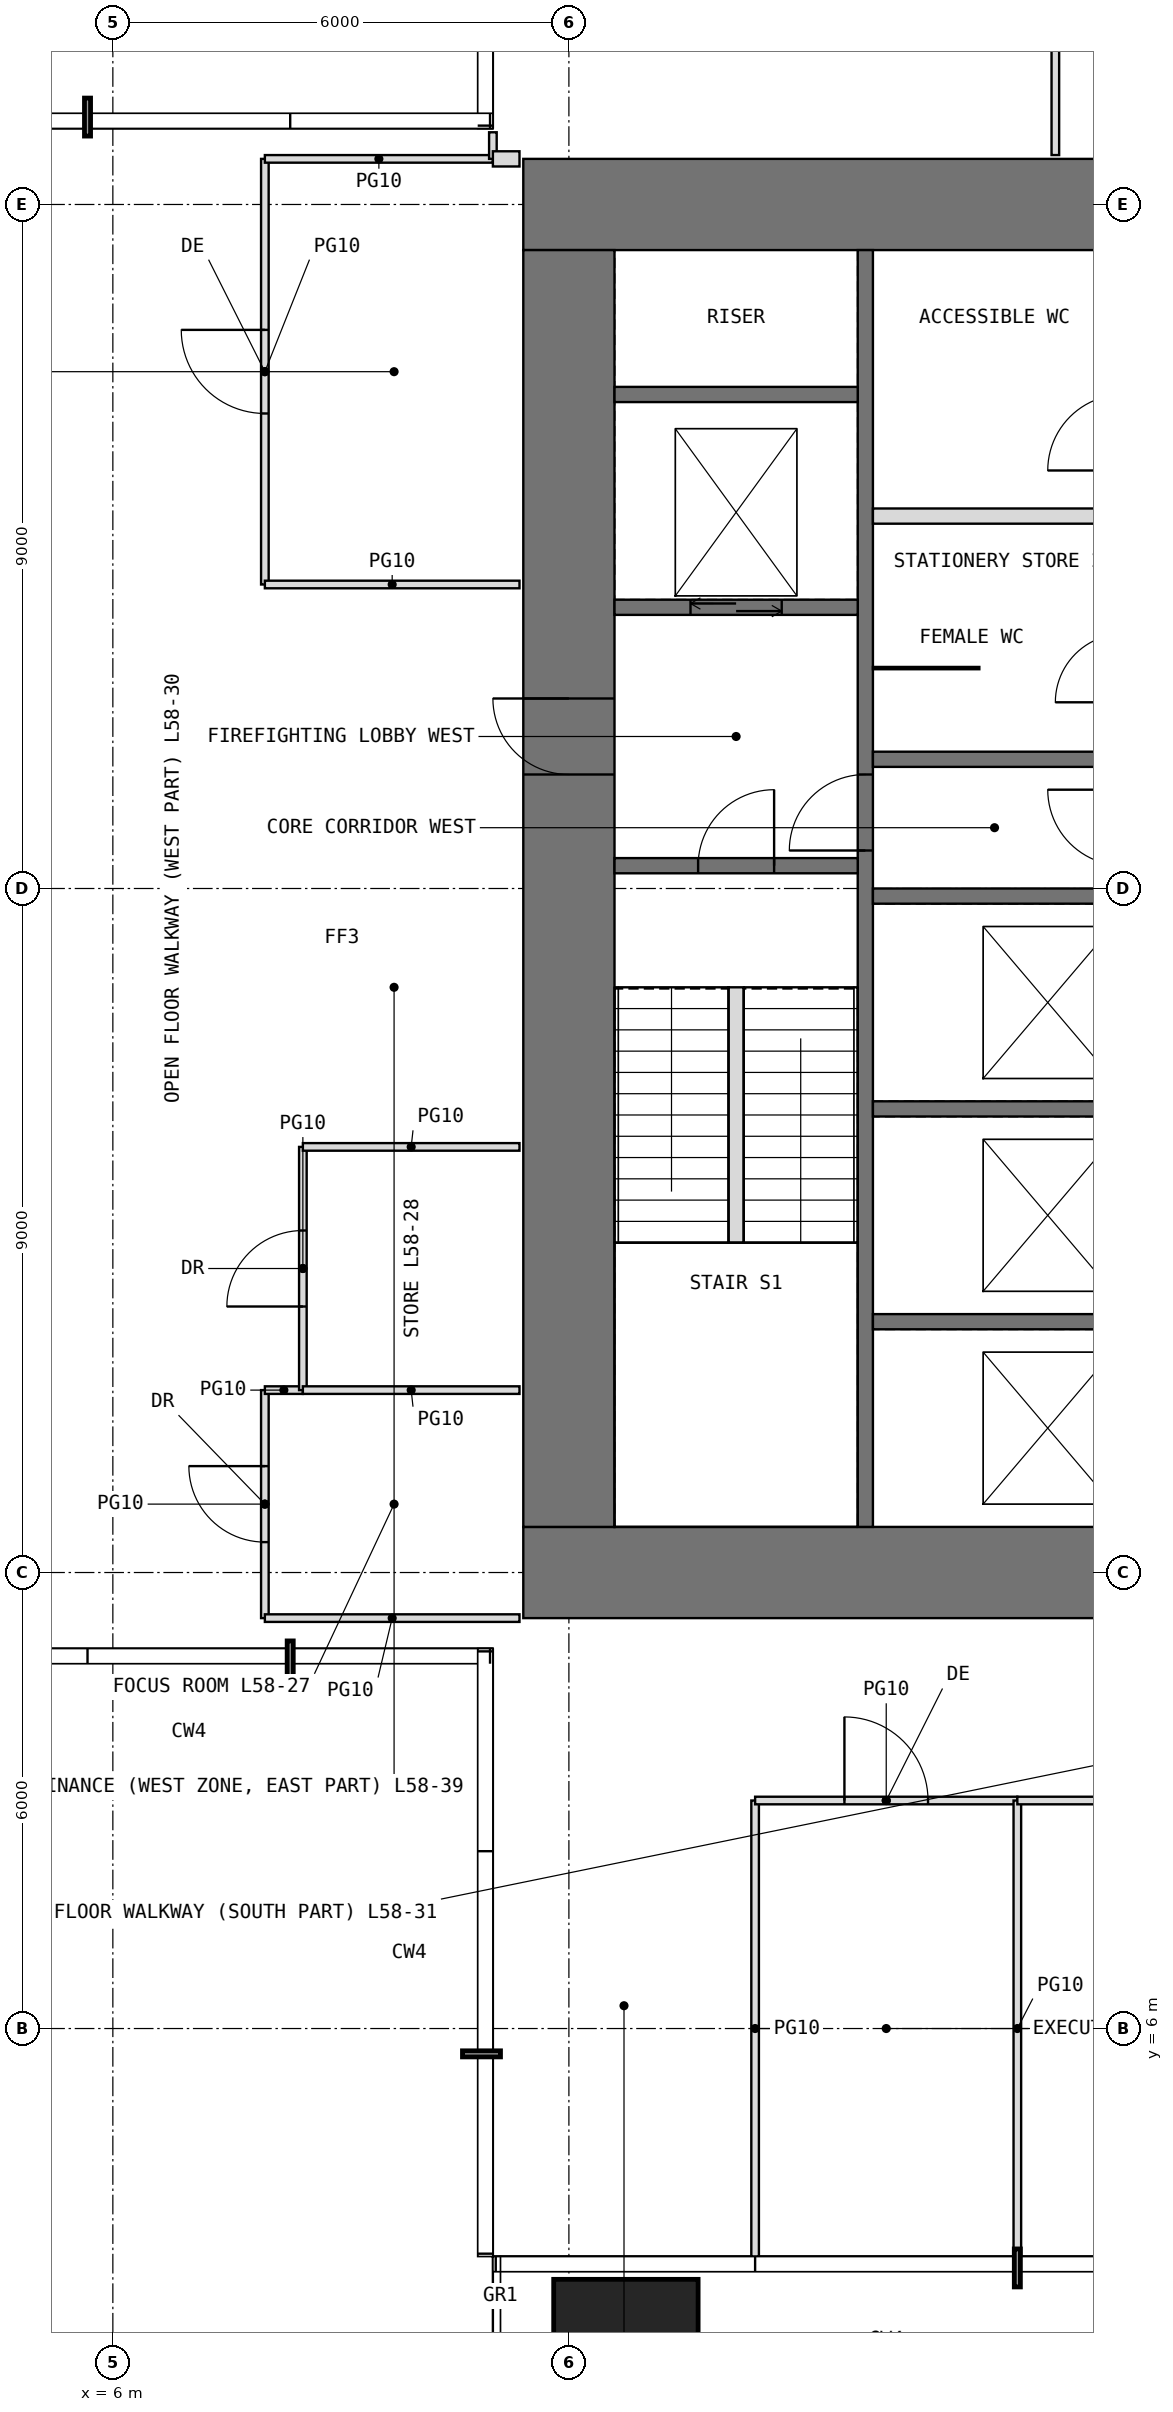
"""IFC4 building model, lengths in metres.
Left out: names, types, materials, properties, quantities, classifications, styles, units other than length and angle.
Written with IfcOpenShell. Run it as: python <this file> out.ifc"""

import sys

from ifc_helpers import new_model, si_unit, direction, frame, frame_2d, origin, origin_2d, place, context, subcontext, project, spatial, rectangle, extrude, element, fill, save


model = new_model("IFC4")
c1 = context("Model", 3, precision=1e-05, world=origin(), true_north=direction((0.0, 1.0)))
c2 = subcontext(c1, "Body", "Model", "MODEL_VIEW")
j1 = project(units=[si_unit("LENGTHUNIT", "METRE"), si_unit("PLANEANGLEUNIT", "RADIAN")], contexts=[c1])
p1 = place(None, origin())
s1 = spatial("IfcSite", under=j1, at=p1, CompositionType="ELEMENT")
p2 = place(p1, origin())
s2 = spatial("IfcBuilding", under=s1, at=p2, CompositionType="ELEMENT")
p3 = place(p2, frame((0.0, 0.0, 244.0)))
s3 = spatial("IfcBuildingStorey", under=s2, at=p3, CompositionType="ELEMENT", Elevation=244.0)
p4 = place(p3, frame((12.75, 1.75, 0.0), z_axis=(0.0, 0.0, 1.0), x_axis=(1.0, 0.0, 0.0)))
e1 = element("IfcColumn", 1, at=p4, inside=s3, PredefinedType="COLUMN", context=c2, shape_type="SweptSolid", body=[
    extrude(rectangle(XDim=1.9, YDim=1.9, at=origin_2d()), origin(), (0.0, 0.0, 1.0), 4.2),
])
p5 = place(p3, frame((11.4, 12.0, -0.05), z_axis=(0.0, 0.0, 1.0), x_axis=(1.0, 0.0, 0.0)))
e2 = element("IfcWall", 2, at=p5, inside=s3, PredefinedType="SHEAR", context=c2, shape_type="SweptSolid", body=[
    extrude(rectangle(XDim=19.2, YDim=1.2, at=frame_2d((9.6, 0.0))), origin(), (0.0, 0.0, 1.0), 4.2),
])
p6 = place(p5, frame((8.6, 0.0, 0.05)))
e3 = element("IfcOpeningElement", 3, at=p6, cuts=e2, PredefinedType="OPENING", context=c2, shape_type="SweptSolid", body=[
    extrude(rectangle(XDim=2.0, YDim=2.2, at=frame_2d((1.0, 1.1))), frame((0.0, 0.61, 0.0), z_axis=(0.0, -1.0, 0.0), x_axis=(1.0, 0.0, 0.0)), (0.0, 0.0, 1.0), 1.22),
])
p7 = place(p3, frame((11.4, 30.0, -0.05), z_axis=(0.0, 0.0, 1.0), x_axis=(1.0, 0.0, 0.0)))
e4 = element("IfcWall", 4, at=p7, inside=s3, PredefinedType="SHEAR", context=c2, shape_type="SweptSolid", body=[
    extrude(rectangle(XDim=19.2, YDim=1.2, at=frame_2d((9.6, 0.0))), origin(), (0.0, 0.0, 1.0), 4.2),
])
p8 = place(p7, frame((8.6, 0.0, 0.05)))
e5 = element("IfcOpeningElement", 5, at=p8, cuts=e4, PredefinedType="OPENING", context=c2, shape_type="SweptSolid", body=[
    extrude(rectangle(XDim=2.0, YDim=2.2, at=frame_2d((1.0, 1.1))), frame((0.0, 0.61, 0.0), z_axis=(0.0, -1.0, 0.0), x_axis=(1.0, 0.0, 0.0)), (0.0, 0.0, 1.0), 1.22),
])
p9 = place(p3, frame((12.0, 12.6, -0.05), z_axis=(0.0, 0.0, 1.0), x_axis=(0.0, 1.0, 0.0)))
e6 = element("IfcWall", 6, at=p9, inside=s3, PredefinedType="SHEAR", context=c2, shape_type="SweptSolid", body=[
    extrude(rectangle(XDim=16.8, YDim=1.2, at=frame_2d((8.4, 0.0))), origin(), (0.0, 0.0, 1.0), 4.2),
])
p10 = place(p9, frame((9.9, 0.0, 0.05)))
e7 = element("IfcOpeningElement", 7, at=p10, cuts=e6, PredefinedType="OPENING", context=c2, shape_type="SweptSolid", body=[
    extrude(rectangle(XDim=1.0, YDim=2.2, at=frame_2d((0.5, 1.1))), frame((0.0, 0.61, 0.0), z_axis=(0.0, -1.0, 0.0), x_axis=(1.0, 0.0, 0.0)), (0.0, 0.0, 1.0), 1.22),
])
p11 = place(p3, frame((15.9, 12.6, -0.05), z_axis=(0.0, 0.0, 1.0), x_axis=(0.0, 1.0, 0.0)))
e8 = element("IfcWall", 8, at=p11, inside=s3, PredefinedType="SHEAR", context=c2, shape_type="SweptSolid", body=[
    extrude(rectangle(XDim=16.8, YDim=0.2, at=frame_2d((8.4, 0.0))), origin(), (0.0, 0.0, 1.0), 4.2),
])
p12 = place(p11, frame((8.9, 0.0, 0.05)))
e9 = element("IfcOpeningElement", 9, at=p12, cuts=e8, PredefinedType="OPENING", context=c2, shape_type="SweptSolid", body=[
    extrude(rectangle(XDim=1.0, YDim=2.2, at=frame_2d((0.5, 1.1))), frame((0.0, 0.11, 0.0), z_axis=(0.0, -1.0, 0.0), x_axis=(1.0, 0.0, 0.0)), (0.0, 0.0, 1.0), 0.22),
])
p13 = place(p3, frame((12.6, 21.3, -0.05), z_axis=(0.0, 0.0, 1.0), x_axis=(1.0, 0.0, 0.0)))
e10 = element("IfcWall", 10, at=p13, inside=s3, PredefinedType="SHEAR", context=c2, shape_type="SweptSolid", body=[
    extrude(rectangle(XDim=3.2, YDim=0.2, at=frame_2d((1.6, 0.0))), origin(), (0.0, 0.0, 1.0), 4.2),
])
p14 = place(p13, frame((1.1, 0.0, 0.05)))
e11 = element("IfcOpeningElement", 11, at=p14, cuts=e10, PredefinedType="OPENING", context=c2, shape_type="SweptSolid", body=[
    extrude(rectangle(XDim=1.0, YDim=2.2, at=frame_2d((0.5, 1.1))), frame((0.0, 0.11, 0.0), z_axis=(0.0, -1.0, 0.0), x_axis=(1.0, 0.0, 0.0)), (0.0, 0.0, 1.0), 0.22),
])
p15 = place(p3, frame((12.6, 24.7, -0.05), z_axis=(0.0, 0.0, 1.0), x_axis=(1.0, 0.0, 0.0)))
e12 = element("IfcWall", 12, at=p15, inside=s3, PredefinedType="SHEAR", context=c2, shape_type="SweptSolid", body=[
    extrude(rectangle(XDim=3.2, YDim=0.2, at=frame_2d((1.6, 0.0))), origin(), (0.0, 0.0, 1.0), 4.2),
])
p16 = place(p15, frame((1.0, 0.0, 0.05)))
e13 = element("IfcOpeningElement", 13, at=p16, cuts=e12, PredefinedType="OPENING", context=c2, shape_type="SweptSolid", body=[
    extrude(rectangle(XDim=1.2, YDim=2.2, at=frame_2d((0.6, 1.1))), frame((0.0, 0.11, 0.0), z_axis=(0.0, -1.0, 0.0), x_axis=(1.0, 0.0, 0.0)), (0.0, 0.0, 1.0), 0.22),
])
for number, where, z_axis, x_axis in (
    (14, (12.6, 27.5, -0.05), (0.0, 0.0, 1.0), (1.0, 0.0, 0.0)),
    (15, (16.0, 15.3, -0.05), (0.0, 0.0, 1.0), (1.0, 0.0, 0.0)),
    (16, (16.0, 18.1, -0.05), (0.0, 0.0, 1.0), (1.0, 0.0, 0.0)),
    (17, (16.0, 20.9, -0.05), (0.0, 0.0, 1.0), (1.0, 0.0, 0.0)),
    (18, (16.0, 22.7, -0.05), (0.0, 0.0, 1.0), (1.0, 0.0, 0.0)),
):
    element("IfcWall", number, at=place(p3, frame(where, z_axis=z_axis, x_axis=x_axis)), inside=s3, PredefinedType="SHEAR", context=c2, shape_type="SweptSolid", body=[
        extrude(rectangle(XDim=3.2, YDim=0.2, at=frame_2d((1.6, 0.0))), origin(), (0.0, 0.0, 1.0), 4.2),
    ])
p17 = place(p3, frame((16.0, 25.9, 0.0), z_axis=(0.0, 0.0, 1.0), x_axis=(1.0, 0.0, 0.0)))
e19 = element("IfcWall", 19, at=p17, inside=s3, PredefinedType="PARTITIONING", context=c2, shape_type="SweptSolid", body=[
    extrude(rectangle(XDim=3.2, YDim=0.2, at=frame_2d((1.6, 0.0))), origin(), (0.0, 0.0, 1.0), 3.95),
])
p18 = place(p3, frame((16.0, 23.9, 0.0), z_axis=(0.0, 0.0, 1.0), x_axis=(1.0, 0.0, 0.0)))
e20 = element("IfcWall", 20, at=p18, inside=s3, PredefinedType="PARTITIONING", context=c2, shape_type="SweptSolid", body=[
    extrude(rectangle(XDim=1.4, YDim=0.03, at=frame_2d((0.7, 0.0))), origin(), (0.0, 0.0, 1.0), 3.95),
])
p19 = place(p3, frame((8.0, 11.4, 0.0), z_axis=(0.0, 0.0, 1.0), x_axis=(0.0, 1.0, 0.0)))
e21 = element("IfcWall", 21, at=p19, inside=s3, PredefinedType="PARTITIONING", context=c2, shape_type="SweptSolid", body=[
    extrude(rectangle(XDim=3.0, YDim=0.1, at=frame_2d((1.5, 0.0))), origin(), (0.0, 0.0, 1.0), 3.95),
])
p20 = place(p19, frame((1.0, 0.0, 0.0)))
e22 = element("IfcOpeningElement", 22, at=p20, cuts=e21, PredefinedType="OPENING", context=c2, shape_type="SweptSolid", body=[
    extrude(rectangle(XDim=1.0, YDim=2.2, at=frame_2d((0.5, 1.1))), frame((0.0, 0.06, 0.0), z_axis=(0.0, -1.0, 0.0), x_axis=(1.0, 0.0, 0.0)), (0.0, 0.0, 1.0), 0.12),
])
p21 = place(p3, frame((8.0, 11.4, 0.0), z_axis=(0.0, 0.0, 1.0), x_axis=(1.0, 0.0, 0.0)))
e23 = element("IfcWall", 23, at=p21, inside=s3, PredefinedType="PARTITIONING", context=c2, shape_type="SweptSolid", body=[
    extrude(rectangle(XDim=3.35, YDim=0.1, at=frame_2d((1.675, 0.0))), origin(), (0.0, 0.0, 1.0), 3.95),
])
p22 = place(p3, frame((8.0, 14.4, 0.0), z_axis=(0.0, 0.0, 1.0), x_axis=(1.0, 0.0, 0.0)))
e24 = element("IfcWall", 24, at=p22, inside=s3, PredefinedType="PARTITIONING", context=c2, shape_type="SweptSolid", body=[
    extrude(rectangle(XDim=0.5, YDim=0.1, at=frame_2d((0.25, 0.0))), origin(), (0.0, 0.0, 1.0), 3.95),
])
p23 = place(p3, frame((8.0, 25.0, 0.0), z_axis=(0.0, 0.0, 1.0), x_axis=(0.0, 1.0, 0.0)))
e25 = element("IfcWall", 25, at=p23, inside=s3, PredefinedType="PARTITIONING", context=c2, shape_type="SweptSolid", body=[
    extrude(rectangle(XDim=5.6, YDim=0.1, at=frame_2d((2.8, 0.0))), origin(), (0.0, 0.0, 1.0), 3.95),
])
p24 = place(p23, frame((2.25, 0.0, 0.0)))
e26 = element("IfcOpeningElement", 26, at=p24, cuts=e25, PredefinedType="OPENING", context=c2, shape_type="SweptSolid", body=[
    extrude(rectangle(XDim=1.1, YDim=2.3, at=frame_2d((0.55, 1.15))), frame((0.0, 0.06, 0.0), z_axis=(0.0, -1.0, 0.0), x_axis=(1.0, 0.0, 0.0)), (0.0, 0.0, 1.0), 0.12),
])
p25 = place(p3, frame((8.0, 25.0, 0.0), z_axis=(0.0, 0.0, 1.0), x_axis=(1.0, 0.0, 0.0)))
e27 = element("IfcWall", 27, at=p25, inside=s3, PredefinedType="PARTITIONING", context=c2, shape_type="SweptSolid", body=[
    extrude(rectangle(XDim=3.35, YDim=0.1, at=frame_2d((1.675, 0.0))), origin(), (0.0, 0.0, 1.0), 3.95),
])
p26 = place(p3, frame((8.0, 30.6, 0.0), z_axis=(0.0, 0.0, 1.0), x_axis=(1.0, 0.0, 0.0)))
e28 = element("IfcWall", 28, at=p26, inside=s3, PredefinedType="PARTITIONING", context=c2, shape_type="SweptSolid", body=[
    extrude(rectangle(XDim=3.0, YDim=0.1, at=frame_2d((1.5, 0.0))), origin(), (0.0, 0.0, 1.0), 3.95),
])
p27 = place(p3, frame((8.5, 14.4, 0.0), z_axis=(0.0, 0.0, 1.0), x_axis=(0.0, 1.0, 0.0)))
e29 = element("IfcWall", 29, at=p27, inside=s3, PredefinedType="PARTITIONING", context=c2, shape_type="SweptSolid", body=[
    extrude(rectangle(XDim=3.2, YDim=0.1, at=frame_2d((1.6, 0.0))), origin(), (0.0, 0.0, 1.0), 3.95),
])
p28 = place(p27, frame((1.1, 0.0, 0.0)))
e30 = element("IfcOpeningElement", 30, at=p28, cuts=e29, PredefinedType="OPENING", context=c2, shape_type="SweptSolid", body=[
    extrude(rectangle(XDim=1.0, YDim=2.2, at=frame_2d((0.5, 1.1))), frame((0.0, 0.06, 0.0), z_axis=(0.0, -1.0, 0.0), x_axis=(1.0, 0.0, 0.0)), (0.0, 0.0, 1.0), 0.12),
])
for number, where, z_axis, x_axis in (
    (31, (8.5, 14.4, 0.0), (0.0, 0.0, 1.0), (1.0, 0.0, 0.0)),
    (32, (8.5, 17.6, 0.0), (0.0, 0.0, 1.0), (1.0, 0.0, 0.0)),
):
    element("IfcWall", number, at=place(p3, frame(where, z_axis=z_axis, x_axis=x_axis)), inside=s3, PredefinedType="PARTITIONING", context=c2, shape_type="SweptSolid", body=[
        extrude(rectangle(XDim=2.85, YDim=0.1, at=frame_2d((1.425, 0.0))), origin(), (0.0, 0.0, 1.0), 3.95),
    ])
p29 = place(p3, frame((11.0, 30.6, 0.0), z_axis=(0.0, 0.0, 1.0), x_axis=(0.0, 1.0, 0.0)))
e33 = element("IfcWall", 33, at=p29, inside=s3, PredefinedType="PARTITIONING", context=c2, shape_type="SweptSolid", body=[
    extrude(rectangle(XDim=0.35, YDim=0.1, at=frame_2d((0.175, 0.0))), origin(), (0.0, 0.0, 1.0), 3.95),
])
p30 = place(p3, frame((11.0, 30.6, 0.0), z_axis=(0.0, 0.0, 1.0), x_axis=(1.0, 0.0, 0.0)))
e34 = element("IfcWall", 34, at=p30, inside=s3, PredefinedType="PARTITIONING", context=c2, shape_type="SweptSolid", body=[
    extrude(rectangle(XDim=0.35, YDim=0.2, at=frame_2d((0.175, 0.0))), origin(), (0.0, 0.0, 1.0), 3.95),
])
p31 = place(p3, frame((14.45, 3.0, 0.0), z_axis=(0.0, 0.0, 1.0), x_axis=(0.0, 1.0, 0.0)))
e35 = element("IfcWall", 35, at=p31, inside=s3, PredefinedType="PARTITIONING", context=c2, shape_type="SweptSolid", body=[
    extrude(rectangle(XDim=6.0, YDim=0.1, at=frame_2d((3.0, 0.0))), origin(), (0.0, 0.0, 1.0), 3.95),
])
p32 = place(p3, frame((14.45, 9.0, 0.0), z_axis=(0.0, 0.0, 1.0), x_axis=(1.0, 0.0, 0.0)))
e36 = element("IfcWall", 36, at=p32, inside=s3, PredefinedType="PARTITIONING", context=c2, shape_type="SweptSolid", body=[
    extrude(rectangle(XDim=3.45, YDim=0.1, at=frame_2d((1.725, 0.0))), origin(), (0.0, 0.0, 1.0), 3.95),
])
p33 = place(p32, frame((1.175, 0.0, 0.0)))
e37 = element("IfcOpeningElement", 37, at=p33, cuts=e36, PredefinedType="OPENING", context=c2, shape_type="SweptSolid", body=[
    extrude(rectangle(XDim=1.1, YDim=2.3, at=frame_2d((0.55, 1.15))), frame((0.0, 0.06, 0.0), z_axis=(0.0, -1.0, 0.0), x_axis=(1.0, 0.0, 0.0)), (0.0, 0.0, 1.0), 0.12),
])
p34 = place(p3, frame((17.9, 3.0, 0.0), z_axis=(0.0, 0.0, 1.0), x_axis=(0.0, 1.0, 0.0)))
e38 = element("IfcWall", 38, at=p34, inside=s3, PredefinedType="PARTITIONING", context=c2, shape_type="SweptSolid", body=[
    extrude(rectangle(XDim=6.0, YDim=0.1, at=frame_2d((3.0, 0.0))), origin(), (0.0, 0.0, 1.0), 3.95),
])
p35 = place(p3, frame((17.9, 9.0, 0.0), z_axis=(0.0, 0.0, 1.0), x_axis=(1.0, 0.0, 0.0)))
e39 = element("IfcWall", 39, at=p35, inside=s3, PredefinedType="PARTITIONING", context=c2, shape_type="SweptSolid", body=[
    extrude(rectangle(XDim=10.3, YDim=0.1, at=frame_2d((5.15, 0.0))), origin(), (0.0, 0.0, 1.0), 3.95),
])
p36 = place(p35, frame((4.8, 0.0, 0.0)))
e40 = element("IfcOpeningElement", 40, at=p36, cuts=e39, PredefinedType="OPENING", context=c2, shape_type="SweptSolid", body=[
    extrude(rectangle(XDim=1.1, YDim=2.3, at=frame_2d((0.55, 1.15))), frame((0.0, 0.06, 0.0), z_axis=(0.0, -1.0, 0.0), x_axis=(1.0, 0.0, 0.0)), (0.0, 0.0, 1.0), 0.12),
])
p37 = place(p3, frame((18.4, 30.65, 0.0), z_axis=(0.0, 0.0, 1.0), x_axis=(0.0, 1.0, 0.0)))
e41 = element("IfcWall", 41, at=p37, inside=s3, PredefinedType="PARTITIONING", context=c2, shape_type="SweptSolid", body=[
    extrude(rectangle(XDim=3.95, YDim=0.1, at=frame_2d((1.975, 0.0))), origin(), (0.0, 0.0, 1.0), 3.95),
])
p38 = place(p3, frame((14.2, 16.34, 0.0), z_axis=(0.0, 0.0, 1.0), x_axis=(0.0, 1.0, 0.0)))
e42 = element("IfcWall", 42, at=p38, inside=s3, PredefinedType="PARTITIONING", context=c2, shape_type="SweptSolid", body=[
    extrude(rectangle(XDim=3.36, YDim=0.2, at=frame_2d((1.68, 0.0))), origin(), (0.0, 0.0, 1.0), 4.2),
])
p39 = place(p10, origin())
e43 = element("IfcDoor", 43, at=p39, inside=s3, OperationType="SINGLE_SWING_RIGHT", PredefinedType="DOOR", context=c2, shape_type="SweptSolid", body=[
    extrude(rectangle(XDim=1.0, YDim=2.2, at=frame_2d((0.5, 1.1))), frame((0.0, 0.025, 0.0), z_axis=(0.0, -1.0, 0.0), x_axis=(1.0, 0.0, 0.0)), (0.0, 0.0, 1.0), 0.05),
])
fill(e7, e43)
p40 = place(p14, origin())
e44 = element("IfcDoor", 44, at=p40, inside=s3, OperationType="SINGLE_SWING_RIGHT", PredefinedType="DOOR", context=c2, shape_type="SweptSolid", body=[
    extrude(rectangle(XDim=1.0, YDim=2.2, at=frame_2d((0.5, 1.1))), frame((0.0, 0.025, 0.0), z_axis=(0.0, -1.0, 0.0), x_axis=(1.0, 0.0, 0.0)), (0.0, 0.0, 1.0), 0.05),
])
fill(e11, e44)
p41 = place(p12, origin())
e45 = element("IfcDoor", 45, at=p41, inside=s3, OperationType="SINGLE_SWING_LEFT", PredefinedType="DOOR", context=c2, shape_type="SweptSolid", body=[
    extrude(rectangle(XDim=1.0, YDim=2.2, at=frame_2d((0.5, 1.1))), frame((0.0, 0.025, 0.0), z_axis=(0.0, -1.0, 0.0), x_axis=(1.0, 0.0, 0.0)), (0.0, 0.0, 1.0), 0.05),
])
fill(e9, e45)
p42 = place(p33, origin())
e46 = element("IfcDoor", 46, at=p42, inside=s3, OperationType="SINGLE_SWING_LEFT", PredefinedType="DOOR", context=c2, shape_type="SweptSolid", body=[
    extrude(rectangle(XDim=1.1, YDim=2.3, at=frame_2d((0.55, 1.15))), frame((0.0, 0.025, 0.0), z_axis=(0.0, -1.0, 0.0), x_axis=(1.0, 0.0, 0.0)), (0.0, 0.0, 1.0), 0.05),
])
fill(e37, e46)
p43 = place(p20, origin())
e47 = element("IfcDoor", 47, at=p43, inside=s3, OperationType="SINGLE_SWING_RIGHT", PredefinedType="DOOR", context=c2, shape_type="SweptSolid", body=[
    extrude(rectangle(XDim=1.0, YDim=2.2, at=frame_2d((0.5, 1.1))), frame((0.0, 0.025, 0.0), z_axis=(0.0, -1.0, 0.0), x_axis=(1.0, 0.0, 0.0)), (0.0, 0.0, 1.0), 0.05),
])
fill(e22, e47)
p44 = place(p28, origin())
e48 = element("IfcDoor", 48, at=p44, inside=s3, OperationType="SINGLE_SWING_LEFT", PredefinedType="DOOR", context=c2, shape_type="SweptSolid", body=[
    extrude(rectangle(XDim=1.0, YDim=2.2, at=frame_2d((0.5, 1.1))), frame((0.0, 0.025, 0.0), z_axis=(0.0, -1.0, 0.0), x_axis=(1.0, 0.0, 0.0)), (0.0, 0.0, 1.0), 0.05),
])
fill(e30, e48)
p45 = place(p24, origin())
e49 = element("IfcDoor", 49, at=p45, inside=s3, OperationType="SINGLE_SWING_RIGHT", PredefinedType="DOOR", context=c2, shape_type="SweptSolid", body=[
    extrude(rectangle(XDim=1.1, YDim=2.3, at=frame_2d((0.55, 1.15))), frame((0.0, 0.025, 0.0), z_axis=(0.0, -1.0, 0.0), x_axis=(1.0, 0.0, 0.0)), (0.0, 0.0, 1.0), 0.05),
])
fill(e26, e49)
p46 = place(p16, origin())
e50 = element("IfcDoor", 50, at=p46, inside=s3, OperationType="DOUBLE_DOOR_SLIDING", PredefinedType="DOOR", context=c2, shape_type="SweptSolid", body=[
    extrude(rectangle(XDim=1.2, YDim=2.2, at=frame_2d((0.6, 1.1))), frame((0.0, 0.025, 0.0), z_axis=(0.0, -1.0, 0.0), x_axis=(1.0, 0.0, 0.0)), (0.0, 0.0, 1.0), 0.05),
])
fill(e13, e50)
save(model, sys.argv[1])
